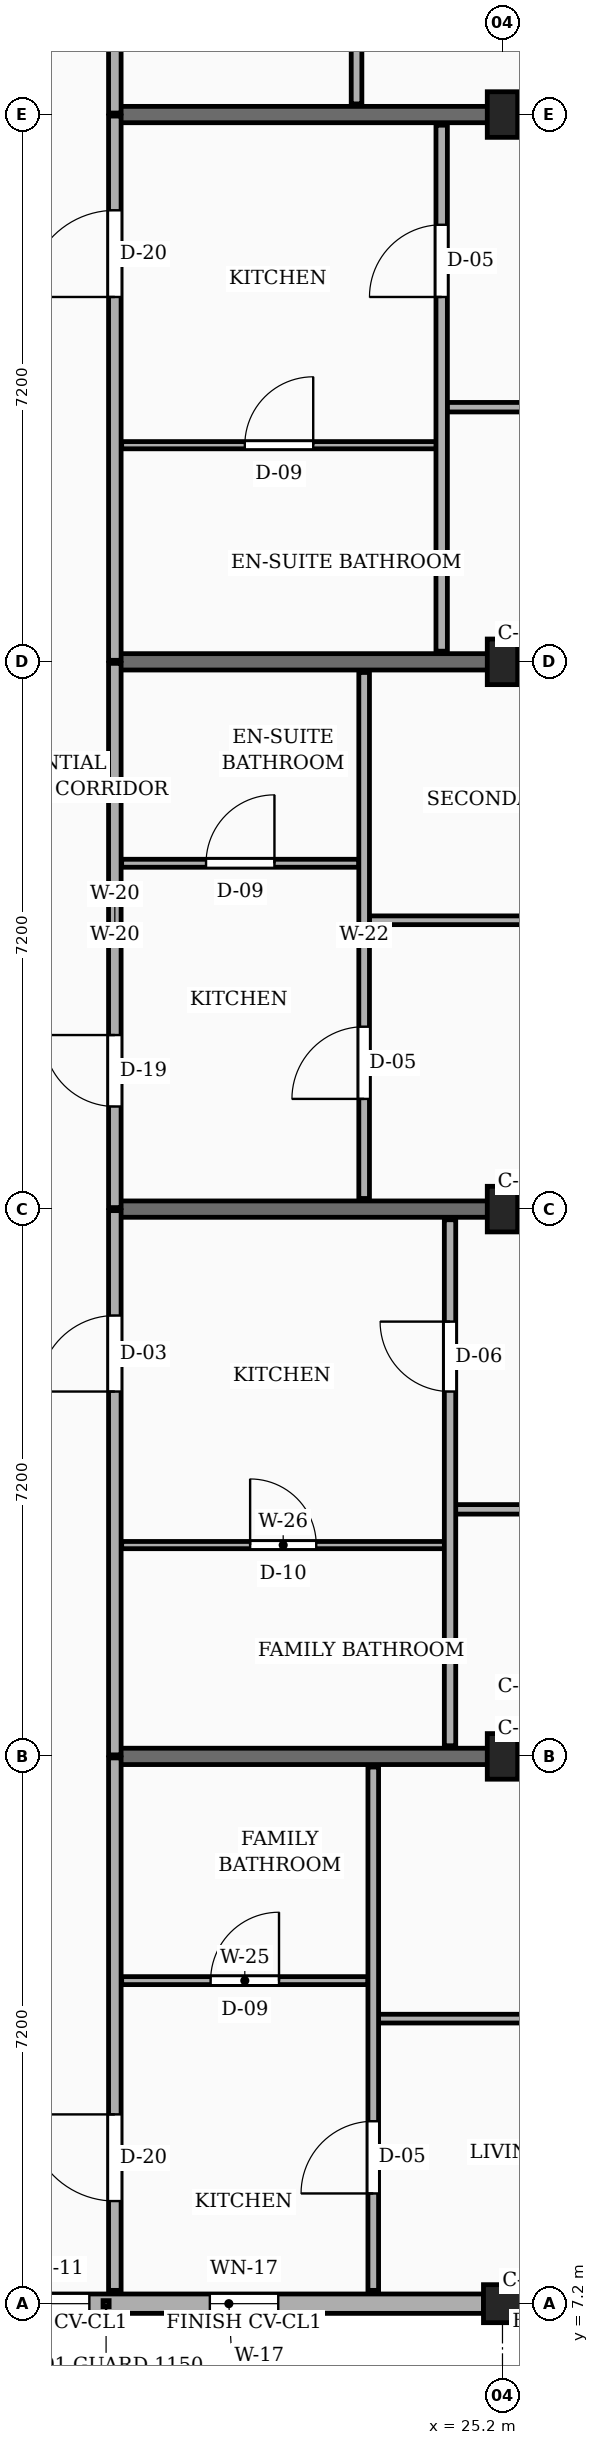
"""IFC4 building model, lengths in metres.
Left out: names, types, materials, properties, quantities, classifications, styles, units other than length and angle.
Written with IfcOpenShell. Run it as: python <this file> out.ifc"""

import sys

from ifc_helpers import new_model, si_unit, direction, frame, frame_2d, origin, origin_2d, place, context, subcontext, project, spatial, rectangle, extrude, element, fill, save


model = new_model("IFC4")
c1 = context("Model", 3, precision=1e-05, world=origin(), true_north=direction((0.0, 1.0)))
c2 = subcontext(c1, "Body", "Model", "MODEL_VIEW")
j1 = project(units=[si_unit("LENGTHUNIT", "METRE"), si_unit("PLANEANGLEUNIT", "RADIAN")], contexts=[c1])
p1 = place(None, origin())
s1 = spatial("IfcSite", under=j1, at=p1, CompositionType="ELEMENT")
p2 = place(p1, origin())
s2 = spatial("IfcBuilding", under=s1, at=p2, CompositionType="ELEMENT")
p3 = place(p2, frame((0.0, 0.0, 32.85)))
s3 = spatial("IfcBuildingStorey", under=s2, at=p3, CompositionType="ELEMENT", Elevation=32.85)
p4 = place(p3, frame((25.2, 7.2, 0.0), z_axis=(0.0, 0.0, 1.0), x_axis=(1.0, 0.0, 0.0)))
e1 = element("IfcColumn", 1, at=p4, inside=s3, PredefinedType="COLUMN", context=c2, shape_type="SweptSolid", body=[
    extrude(rectangle(XDim=0.5, YDim=0.5, at=origin_2d()), origin(), (0.0, 0.0, 1.0), 3.15),
])
for number, where, z_axis, x_axis in (
    (2, (25.2, 14.4, 0.0), (0.0, 0.0, 1.0), (1.0, 0.0, 0.0)),
    (3, (25.2, 21.6, 0.0), (0.0, 0.0, 1.0), (1.0, 0.0, 0.0)),
    (4, (25.2, 28.8, 0.0), (0.0, 0.0, 1.0), (1.0, 0.0, 0.0)),
    (5, (25.2, 36.0, 0.0), (0.0, 0.0, 1.0), (1.0, 0.0, 0.0)),
):
    element("IfcColumn", number, at=place(p3, frame(where, z_axis=z_axis, x_axis=x_axis)), inside=s3, PredefinedType="COLUMN", context=c2, shape_type="SweptSolid", body=[
        extrude(rectangle(XDim=0.4, YDim=0.6, at=origin_2d()), origin(), (0.0, 0.0, 1.0), 3.15),
    ])
for number, where, z_axis, x_axis in (
    (6, (20.1, 14.4, 0.0), (0.0, 0.0, 1.0), (1.0, 0.0, 0.0)),
    (7, (20.1, 21.6, 0.0), (0.0, 0.0, 1.0), (1.0, 0.0, 0.0)),
    (8, (20.1, 28.8, 0.0), (0.0, 0.0, 1.0), (1.0, 0.0, 0.0)),
    (9, (20.1, 36.0, 0.0), (0.0, 0.0, 1.0), (1.0, 0.0, 0.0)),
):
    element("IfcWall", number, at=place(p3, frame(where, z_axis=z_axis, x_axis=x_axis)), inside=s3, PredefinedType="SOLIDWALL", context=c2, shape_type="SweptSolid", body=[
        extrude(rectangle(XDim=12.05, YDim=0.215, at=frame_2d((6.025, 0.0))), origin(), (0.0, 0.0, 1.0), 2.17),
    ])
p5 = place(p3, frame((18.25, 7.2, 0.0), z_axis=(0.0, 0.0, 1.0), x_axis=(1.0, 0.0, 0.0)))
e10 = element("IfcWall", 10, at=p5, inside=s3, PredefinedType="SOLIDWALL", context=c2, shape_type="SweptSolid", body=[
    extrude(rectangle(XDim=6.7, YDim=0.255, at=frame_2d((3.35, 0.0))), origin(), (0.0, 0.0, 1.0), 2.44),
])
p6 = place(p5, frame((0.475, 0.0, 0.78)))
e11 = element("IfcOpeningElement", 11, at=p6, cuts=e10, PredefinedType="OPENING", context=c2, shape_type="SweptSolid", body=[
    extrude(rectangle(XDim=1.04, YDim=1.26, at=frame_2d((0.52, 0.63))), frame((0.0, 0.137, 0.0), z_axis=(0.0, -1.0, 0.0), x_axis=(1.0, 0.0, 0.0)), (0.0, 0.0, 1.0), 0.275),
])
p7 = place(p5, frame((3.1, 0.0, 0.78)))
e12 = element("IfcOpeningElement", 12, at=p7, cuts=e10, PredefinedType="OPENING", context=c2, shape_type="SweptSolid", body=[
    extrude(rectangle(XDim=0.9, YDim=1.36, at=frame_2d((0.45, 0.68))), frame((0.0, 0.137, 0.0), z_axis=(0.0, -1.0, 0.0), x_axis=(1.0, 0.0, 0.0)), (0.0, 0.0, 1.0), 0.275),
])
p8 = place(p3, frame((20.1, 7.375, 0.0), z_axis=(0.0, 0.0, 1.0), x_axis=(0.0, 1.0, 0.0)))
e13 = element("IfcWall", 13, at=p8, inside=s3, PredefinedType="PARTITIONING", context=c2, shape_type="SweptSolid", body=[
    extrude(rectangle(XDim=7.005, YDim=0.165, at=frame_2d((3.502, 0.0))), origin(), (0.0, 0.0, 1.0), 2.305),
])
p9 = place(p8, frame((1.175, 0.0, 0.0)))
e14 = element("IfcOpeningElement", 14, at=p9, cuts=e13, PredefinedType="OPENING", context=c2, shape_type="SweptSolid", body=[
    extrude(rectangle(XDim=1.14, YDim=2.18, at=frame_2d((0.57, 1.09))), frame((0.0, 0.093, 0.0), z_axis=(0.0, -1.0, 0.0), x_axis=(1.0, 0.0, 0.0)), (0.0, 0.0, 1.0), 0.185),
])
p10 = place(p3, frame((20.1, 14.42, 0.0), z_axis=(0.0, 0.0, 1.0), x_axis=(0.0, 1.0, 0.0)))
e15 = element("IfcWall", 15, at=p10, inside=s3, PredefinedType="PARTITIONING", context=c2, shape_type="SweptSolid", body=[
    extrude(rectangle(XDim=7.16, YDim=0.165, at=frame_2d((3.58, 0.0))), origin(), (0.0, 0.0, 1.0), 2.305),
])
p11 = place(p10, frame((4.78, 0.0, 0.0)))
e16 = element("IfcOpeningElement", 16, at=p11, cuts=e15, PredefinedType="OPENING", context=c2, shape_type="SweptSolid", body=[
    extrude(rectangle(XDim=1.0, YDim=2.15, at=frame_2d((0.5, 1.075))), frame((0.0, 0.093, 0.0), z_axis=(0.0, -1.0, 0.0), x_axis=(1.0, 0.0, 0.0)), (0.0, 0.0, 1.0), 0.185),
])
p12 = place(p3, frame((20.1, 21.62, 0.0), z_axis=(0.0, 0.0, 1.0), x_axis=(0.0, 1.0, 0.0)))
e17 = element("IfcWall", 17, at=p12, inside=s3, PredefinedType="PARTITIONING", context=c2, shape_type="SweptSolid", body=[
    extrude(rectangle(XDim=7.16, YDim=0.165, at=frame_2d((3.58, 0.0))), origin(), (0.0, 0.0, 1.0), 2.305),
])
p13 = place(p12, frame((1.33, 0.0, 0.0)))
e18 = element("IfcOpeningElement", 18, at=p13, cuts=e17, PredefinedType="OPENING", context=c2, shape_type="SweptSolid", body=[
    extrude(rectangle(XDim=0.94, YDim=2.12, at=frame_2d((0.47, 1.06))), frame((0.0, 0.093, 0.0), z_axis=(0.0, -1.0, 0.0), x_axis=(1.0, 0.0, 0.0)), (0.0, 0.0, 1.0), 0.185),
])
p14 = place(p3, frame((20.1, 28.82, 0.0), z_axis=(0.0, 0.0, 1.0), x_axis=(0.0, 1.0, 0.0)))
e19 = element("IfcWall", 19, at=p14, inside=s3, PredefinedType="PARTITIONING", context=c2, shape_type="SweptSolid", body=[
    extrude(rectangle(XDim=7.16, YDim=0.165, at=frame_2d((3.58, 0.0))), origin(), (0.0, 0.0, 1.0), 2.305),
])
p15 = place(p14, frame((4.78, 0.0, 0.0)))
e20 = element("IfcOpeningElement", 20, at=p15, cuts=e19, PredefinedType="OPENING", context=c2, shape_type="SweptSolid", body=[
    extrude(rectangle(XDim=1.14, YDim=2.18, at=frame_2d((0.57, 1.09))), frame((0.0, 0.093, 0.0), z_axis=(0.0, -1.0, 0.0), x_axis=(1.0, 0.0, 0.0)), (0.0, 0.0, 1.0), 0.185),
])
p16 = place(p3, frame((20.1, 36.02, 0.0), z_axis=(0.0, 0.0, 1.0), x_axis=(0.0, 1.0, 0.0)))
e21 = element("IfcWall", 21, at=p16, inside=s3, PredefinedType="PARTITIONING", context=c2, shape_type="SweptSolid", body=[
    extrude(rectangle(XDim=7.005, YDim=0.165, at=frame_2d((3.502, 0.0))), origin(), (0.0, 0.0, 1.0), 2.305),
])
p17 = place(p16, frame((1.33, 0.0, 0.0)))
e22 = element("IfcOpeningElement", 22, at=p17, cuts=e21, PredefinedType="OPENING", context=c2, shape_type="SweptSolid", body=[
    extrude(rectangle(XDim=1.0, YDim=2.15, at=frame_2d((0.5, 1.075))), frame((0.0, 0.093, 0.0), z_axis=(0.0, -1.0, 0.0), x_axis=(1.0, 0.0, 0.0)), (0.0, 0.0, 1.0), 0.185),
])
p18 = place(p3, frame((23.57, 10.95, 0.0), z_axis=(0.0, 0.0, 1.0), x_axis=(1.0, 0.0, 0.0)))
e23 = element("IfcWall", 23, at=p18, inside=s3, PredefinedType="PARTITIONING", context=c2, shape_type="SweptSolid", body=[
    extrude(rectangle(XDim=8.655, YDim=0.115, at=frame_2d((4.328, 0.0))), origin(), (0.0, 0.0, 1.0), 2.305),
])
p19 = place(p18, frame((3.877, 0.0, 0.0)))
e24 = element("IfcOpeningElement", 24, at=p19, cuts=e23, PredefinedType="OPENING", context=c2, shape_type="SweptSolid", body=[
    extrude(rectangle(XDim=0.9, YDim=2.1, at=frame_2d((0.45, 1.05))), frame((0.0, 0.067, 0.0), z_axis=(0.0, -1.0, 0.0), x_axis=(1.0, 0.0, 0.0)), (0.0, 0.0, 1.0), 0.135),
])
p20 = place(p3, frame((20.19, 11.45, 0.0), z_axis=(0.0, 0.0, 1.0), x_axis=(1.0, 0.0, 0.0)))
e25 = element("IfcWall", 25, at=p20, inside=s3, PredefinedType="PARTITIONING", context=c2, shape_type="SweptSolid", body=[
    extrude(rectangle(XDim=3.24, YDim=0.105, at=frame_2d((1.62, 0.0))), origin(), (0.0, 0.0, 1.0), 2.305),
])
p21 = place(p20, frame((1.17, 0.0, 0.0)))
e26 = element("IfcOpeningElement", 26, at=p21, cuts=e25, PredefinedType="OPENING", context=c2, shape_type="SweptSolid", body=[
    extrude(rectangle(XDim=0.9, YDim=2.05, at=frame_2d((0.45, 1.025))), frame((0.0, 0.062, 0.0), z_axis=(0.0, -1.0, 0.0), x_axis=(1.0, 0.0, 0.0)), (0.0, 0.0, 1.0), 0.125),
])
p22 = place(p3, frame((23.5, 7.375, 0.0), z_axis=(0.0, 0.0, 1.0), x_axis=(0.0, 1.0, 0.0)))
e27 = element("IfcWall", 27, at=p22, inside=s3, PredefinedType="PARTITIONING", context=c2, shape_type="SweptSolid", body=[
    extrude(rectangle(XDim=6.885, YDim=0.14, at=frame_2d((3.442, 0.0))), origin(), (0.0, 0.0, 1.0), 2.305),
])
p23 = place(p22, frame((1.275, 0.0, 0.0)))
e28 = element("IfcOpeningElement", 28, at=p23, cuts=e27, PredefinedType="OPENING", context=c2, shape_type="SweptSolid", body=[
    extrude(rectangle(XDim=0.95, YDim=2.1, at=frame_2d((0.475, 1.05))), frame((0.0, 0.08, 0.0), z_axis=(0.0, -1.0, 0.0), x_axis=(1.0, 0.0, 0.0)), (0.0, 0.0, 1.0), 0.16),
])
p24 = place(p3, frame((24.58, 17.65, 0.0), z_axis=(0.0, 0.0, 1.0), x_axis=(1.0, 0.0, 0.0)))
e29 = element("IfcWall", 29, at=p24, inside=s3, PredefinedType="PARTITIONING", context=c2, shape_type="SweptSolid", body=[
    extrude(rectangle(XDim=7.645, YDim=0.125, at=frame_2d((3.823, 0.0))), origin(), (0.0, 0.0, 1.0), 2.305),
])
p25 = place(p24, frame((3.383, 0.0, 0.0)))
e30 = element("IfcOpeningElement", 30, at=p25, cuts=e29, PredefinedType="OPENING", context=c2, shape_type="SweptSolid", body=[
    extrude(rectangle(XDim=0.88, YDim=2.08, at=frame_2d((0.44, 1.04))), frame((0.0, 0.073, 0.0), z_axis=(0.0, -1.0, 0.0), x_axis=(1.0, 0.0, 0.0)), (0.0, 0.0, 1.0), 0.145),
])
p26 = place(p3, frame((20.19, 17.18, 0.0), z_axis=(0.0, 0.0, 1.0), x_axis=(1.0, 0.0, 0.0)))
e31 = element("IfcWall", 31, at=p26, inside=s3, PredefinedType="PARTITIONING", context=c2, shape_type="SweptSolid", body=[
    extrude(rectangle(XDim=4.25, YDim=0.095, at=frame_2d((2.125, 0.0))), origin(), (0.0, 0.0, 1.0), 2.305),
])
p27 = place(p26, frame((1.69, 0.0, 0.0)))
e32 = element("IfcOpeningElement", 32, at=p27, cuts=e31, PredefinedType="OPENING", context=c2, shape_type="SweptSolid", body=[
    extrude(rectangle(XDim=0.87, YDim=2.05, at=frame_2d((0.435, 1.025))), frame((0.0, 0.058, 0.0), z_axis=(0.0, -1.0, 0.0), x_axis=(1.0, 0.0, 0.0)), (0.0, 0.0, 1.0), 0.115),
])
p28 = place(p3, frame((24.51, 14.54, 0.0), z_axis=(0.0, 0.0, 1.0), x_axis=(0.0, 1.0, 0.0)))
e33 = element("IfcWall", 33, at=p28, inside=s3, PredefinedType="PARTITIONING", context=c2, shape_type="SweptSolid", body=[
    extrude(rectangle(XDim=6.92, YDim=0.15, at=frame_2d((3.46, 0.0))), origin(), (0.0, 0.0, 1.0), 2.305),
])
p29 = place(p28, frame((4.66, 0.0, 0.0)))
e34 = element("IfcOpeningElement", 34, at=p29, cuts=e33, PredefinedType="OPENING", context=c2, shape_type="SweptSolid", body=[
    extrude(rectangle(XDim=0.92, YDim=2.1, at=frame_2d((0.46, 1.05))), frame((0.0, 0.085, 0.0), z_axis=(0.0, -1.0, 0.0), x_axis=(1.0, 0.0, 0.0)), (0.0, 0.0, 1.0), 0.17),
])
p30 = place(p3, frame((23.45, 25.4, 0.0), z_axis=(0.0, 0.0, 1.0), x_axis=(1.0, 0.0, 0.0)))
e35 = element("IfcWall", 35, at=p30, inside=s3, PredefinedType="PARTITIONING", context=c2, shape_type="SweptSolid", body=[
    extrude(rectangle(XDim=8.775, YDim=0.115, at=frame_2d((4.388, 0.0))), origin(), (0.0, 0.0, 1.0), 2.305),
])
p31 = place(p30, frame((3.938, 0.0, 0.0)))
e36 = element("IfcOpeningElement", 36, at=p31, cuts=e35, PredefinedType="OPENING", context=c2, shape_type="SweptSolid", body=[
    extrude(rectangle(XDim=0.9, YDim=2.1, at=frame_2d((0.45, 1.05))), frame((0.0, 0.067, 0.0), z_axis=(0.0, -1.0, 0.0), x_axis=(1.0, 0.0, 0.0)), (0.0, 0.0, 1.0), 0.135),
])
p32 = place(p3, frame((20.19, 26.15, 0.0), z_axis=(0.0, 0.0, 1.0), x_axis=(1.0, 0.0, 0.0)))
e37 = element("IfcWall", 37, at=p32, inside=s3, PredefinedType="PARTITIONING", context=c2, shape_type="SweptSolid", body=[
    extrude(rectangle(XDim=3.12, YDim=0.105, at=frame_2d((1.56, 0.0))), origin(), (0.0, 0.0, 1.0), 2.305),
])
p33 = place(p32, frame((1.11, 0.0, 0.0)))
e38 = element("IfcOpeningElement", 38, at=p33, cuts=e37, PredefinedType="OPENING", context=c2, shape_type="SweptSolid", body=[
    extrude(rectangle(XDim=0.9, YDim=2.05, at=frame_2d((0.45, 1.025))), frame((0.0, 0.062, 0.0), z_axis=(0.0, -1.0, 0.0), x_axis=(1.0, 0.0, 0.0)), (0.0, 0.0, 1.0), 0.125),
])
p34 = place(p3, frame((23.38, 21.74, 0.0), z_axis=(0.0, 0.0, 1.0), x_axis=(0.0, 1.0, 0.0)))
e39 = element("IfcWall", 39, at=p34, inside=s3, PredefinedType="PARTITIONING", context=c2, shape_type="SweptSolid", body=[
    extrude(rectangle(XDim=6.92, YDim=0.14, at=frame_2d((3.46, 0.0))), origin(), (0.0, 0.0, 1.0), 2.305),
])
p35 = place(p34, frame((1.31, 0.0, 0.0)))
e40 = element("IfcOpeningElement", 40, at=p35, cuts=e39, PredefinedType="OPENING", context=c2, shape_type="SweptSolid", body=[
    extrude(rectangle(XDim=0.95, YDim=2.1, at=frame_2d((0.475, 1.05))), frame((0.0, 0.08, 0.0), z_axis=(0.0, -1.0, 0.0), x_axis=(1.0, 0.0, 0.0)), (0.0, 0.0, 1.0), 0.16),
])
p36 = place(p3, frame((24.47, 32.15, 0.0), z_axis=(0.0, 0.0, 1.0), x_axis=(1.0, 0.0, 0.0)))
e41 = element("IfcWall", 41, at=p36, inside=s3, PredefinedType="PARTITIONING", context=c2, shape_type="SweptSolid", body=[
    extrude(rectangle(XDim=7.755, YDim=0.125, at=frame_2d((3.877, 0.0))), origin(), (0.0, 0.0, 1.0), 2.305),
])
p37 = place(p36, frame((3.427, 0.0, 0.0)))
e42 = element("IfcOpeningElement", 42, at=p37, cuts=e41, PredefinedType="OPENING", context=c2, shape_type="SweptSolid", body=[
    extrude(rectangle(XDim=0.9, YDim=2.1, at=frame_2d((0.45, 1.05))), frame((0.0, 0.073, 0.0), z_axis=(0.0, -1.0, 0.0), x_axis=(1.0, 0.0, 0.0)), (0.0, 0.0, 1.0), 0.145),
])
p38 = place(p3, frame((20.19, 31.65, 0.0), z_axis=(0.0, 0.0, 1.0), x_axis=(1.0, 0.0, 0.0)))
e43 = element("IfcWall", 43, at=p38, inside=s3, PredefinedType="PARTITIONING", context=c2, shape_type="SweptSolid", body=[
    extrude(rectangle(XDim=4.14, YDim=0.095, at=frame_2d((2.07, 0.0))), origin(), (0.0, 0.0, 1.0), 2.305),
])
p39 = place(p38, frame((1.62, 0.0, 0.0)))
e44 = element("IfcOpeningElement", 44, at=p39, cuts=e43, PredefinedType="OPENING", context=c2, shape_type="SweptSolid", body=[
    extrude(rectangle(XDim=0.9, YDim=2.05, at=frame_2d((0.45, 1.025))), frame((0.0, 0.058, 0.0), z_axis=(0.0, -1.0, 0.0), x_axis=(1.0, 0.0, 0.0)), (0.0, 0.0, 1.0), 0.115),
])
p40 = place(p3, frame((24.4, 28.94, 0.0), z_axis=(0.0, 0.0, 1.0), x_axis=(0.0, 1.0, 0.0)))
e45 = element("IfcWall", 45, at=p40, inside=s3, PredefinedType="PARTITIONING", context=c2, shape_type="SweptSolid", body=[
    extrude(rectangle(XDim=6.92, YDim=0.15, at=frame_2d((3.46, 0.0))), origin(), (0.0, 0.0, 1.0), 2.305),
])
p41 = place(p40, frame((4.66, 0.0, 0.0)))
e46 = element("IfcOpeningElement", 46, at=p41, cuts=e45, PredefinedType="OPENING", context=c2, shape_type="SweptSolid", body=[
    extrude(rectangle(XDim=0.95, YDim=2.1, at=frame_2d((0.475, 1.05))), frame((0.0, 0.085, 0.0), z_axis=(0.0, -1.0, 0.0), x_axis=(1.0, 0.0, 0.0)), (0.0, 0.0, 1.0), 0.17),
])
p42 = place(p3, frame((23.28, 36.14, 0.0), z_axis=(0.0, 0.0, 1.0), x_axis=(0.0, 1.0, 0.0)))
e47 = element("IfcWall", 47, at=p42, inside=s3, PredefinedType="PARTITIONING", context=c2, shape_type="SweptSolid", body=[
    extrude(rectangle(XDim=6.885, YDim=0.14, at=frame_2d((3.442, 0.0))), origin(), (0.0, 0.0, 1.0), 2.305),
])
p43 = place(p42, frame((1.31, 0.0, 0.0)))
e48 = element("IfcOpeningElement", 48, at=p43, cuts=e47, PredefinedType="OPENING", context=c2, shape_type="SweptSolid", body=[
    extrude(rectangle(XDim=0.92, YDim=2.1, at=frame_2d((0.46, 1.05))), frame((0.0, 0.08, 0.0), z_axis=(0.0, -1.0, 0.0), x_axis=(1.0, 0.0, 0.0)), (0.0, 0.0, 1.0), 0.16),
])
p44 = place(p6, origin())
e49 = element("IfcWindow", 49, at=p44, inside=s3, PartitioningType="SINGLE_PANEL", PredefinedType="WINDOW", context=c2, shape_type="SweptSolid", body=[
    extrude(rectangle(XDim=1.04, YDim=1.26, at=frame_2d((0.52, 0.63))), frame((0.0, 0.03, 0.0), z_axis=(0.0, -1.0, 0.0), x_axis=(1.0, 0.0, 0.0)), (0.0, 0.0, 1.0), 0.06),
])
fill(e11, e49)
p45 = place(p7, origin())
e50 = element("IfcWindow", 50, at=p45, inside=s3, PartitioningType="SINGLE_PANEL", PredefinedType="WINDOW", context=c2, shape_type="SweptSolid", body=[
    extrude(rectangle(XDim=0.9, YDim=1.36, at=frame_2d((0.45, 0.68))), frame((0.0, 0.03, 0.0), z_axis=(0.0, -1.0, 0.0), x_axis=(1.0, 0.0, 0.0)), (0.0, 0.0, 1.0), 0.06),
])
fill(e12, e50)
p46 = place(p9, origin())
e51 = element("IfcDoor", 51, at=p46, inside=s3, OperationType="SINGLE_SWING_RIGHT", PredefinedType="DOOR", context=c2, shape_type="SweptSolid", body=[
    extrude(rectangle(XDim=1.14, YDim=2.18, at=frame_2d((0.57, 1.09))), frame((0.0, 0.025, 0.0), z_axis=(0.0, -1.0, 0.0), x_axis=(1.0, 0.0, 0.0)), (0.0, 0.0, 1.0), 0.05),
])
fill(e14, e51)
p47 = place(p11, origin())
e52 = element("IfcDoor", 52, at=p47, inside=s3, OperationType="SINGLE_SWING_LEFT", PredefinedType="DOOR", context=c2, shape_type="SweptSolid", body=[
    extrude(rectangle(XDim=1.0, YDim=2.15, at=frame_2d((0.5, 1.075))), frame((0.0, 0.025, 0.0), z_axis=(0.0, -1.0, 0.0), x_axis=(1.0, 0.0, 0.0)), (0.0, 0.0, 1.0), 0.05),
])
fill(e16, e52)
p48 = place(p13, origin())
e53 = element("IfcDoor", 53, at=p48, inside=s3, OperationType="SINGLE_SWING_RIGHT", PredefinedType="DOOR", context=c2, shape_type="SweptSolid", body=[
    extrude(rectangle(XDim=0.94, YDim=2.12, at=frame_2d((0.47, 1.06))), frame((0.0, 0.025, 0.0), z_axis=(0.0, -1.0, 0.0), x_axis=(1.0, 0.0, 0.0)), (0.0, 0.0, 1.0), 0.05),
])
fill(e18, e53)
p49 = place(p15, origin())
e54 = element("IfcDoor", 54, at=p49, inside=s3, OperationType="SINGLE_SWING_LEFT", PredefinedType="DOOR", context=c2, shape_type="SweptSolid", body=[
    extrude(rectangle(XDim=1.14, YDim=2.18, at=frame_2d((0.57, 1.09))), frame((0.0, 0.025, 0.0), z_axis=(0.0, -1.0, 0.0), x_axis=(1.0, 0.0, 0.0)), (0.0, 0.0, 1.0), 0.05),
])
fill(e20, e54)
p50 = place(p21, origin())
e55 = element("IfcDoor", 55, at=p50, inside=s3, OperationType="SINGLE_SWING_RIGHT", PredefinedType="DOOR", context=c2, shape_type="SweptSolid", body=[
    extrude(rectangle(XDim=0.9, YDim=2.05, at=frame_2d((0.45, 1.025))), frame((0.0, 0.025, 0.0), z_axis=(0.0, -1.0, 0.0), x_axis=(1.0, 0.0, 0.0)), (0.0, 0.0, 1.0), 0.05),
])
fill(e26, e55)
p51 = place(p23, origin())
e56 = element("IfcDoor", 56, at=p51, inside=s3, OperationType="SINGLE_SWING_LEFT", PredefinedType="DOOR", context=c2, shape_type="SweptSolid", body=[
    extrude(rectangle(XDim=0.95, YDim=2.1, at=frame_2d((0.475, 1.05))), frame((0.0, 0.025, 0.0), z_axis=(0.0, -1.0, 0.0), x_axis=(1.0, 0.0, 0.0)), (0.0, 0.0, 1.0), 0.05),
])
fill(e28, e56)
p52 = place(p27, origin())
e57 = element("IfcDoor", 57, at=p52, inside=s3, OperationType="SINGLE_SWING_LEFT", PredefinedType="DOOR", context=c2, shape_type="SweptSolid", body=[
    extrude(rectangle(XDim=0.87, YDim=2.05, at=frame_2d((0.435, 1.025))), frame((0.0, 0.025, 0.0), z_axis=(0.0, -1.0, 0.0), x_axis=(1.0, 0.0, 0.0)), (0.0, 0.0, 1.0), 0.05),
])
fill(e32, e57)
p53 = place(p29, origin())
e58 = element("IfcDoor", 58, at=p53, inside=s3, OperationType="SINGLE_SWING_RIGHT", PredefinedType="DOOR", context=c2, shape_type="SweptSolid", body=[
    extrude(rectangle(XDim=0.92, YDim=2.1, at=frame_2d((0.46, 1.05))), frame((0.0, 0.025, 0.0), z_axis=(0.0, -1.0, 0.0), x_axis=(1.0, 0.0, 0.0)), (0.0, 0.0, 1.0), 0.05),
])
fill(e34, e58)
p54 = place(p33, origin())
e59 = element("IfcDoor", 59, at=p54, inside=s3, OperationType="SINGLE_SWING_RIGHT", PredefinedType="DOOR", context=c2, shape_type="SweptSolid", body=[
    extrude(rectangle(XDim=0.9, YDim=2.05, at=frame_2d((0.45, 1.025))), frame((0.0, 0.025, 0.0), z_axis=(0.0, -1.0, 0.0), x_axis=(1.0, 0.0, 0.0)), (0.0, 0.0, 1.0), 0.05),
])
fill(e38, e59)
p55 = place(p35, origin())
e60 = element("IfcDoor", 60, at=p55, inside=s3, OperationType="SINGLE_SWING_LEFT", PredefinedType="DOOR", context=c2, shape_type="SweptSolid", body=[
    extrude(rectangle(XDim=0.95, YDim=2.1, at=frame_2d((0.475, 1.05))), frame((0.0, 0.025, 0.0), z_axis=(0.0, -1.0, 0.0), x_axis=(1.0, 0.0, 0.0)), (0.0, 0.0, 1.0), 0.05),
])
fill(e40, e60)
p56 = place(p39, origin())
e61 = element("IfcDoor", 61, at=p56, inside=s3, OperationType="SINGLE_SWING_RIGHT", PredefinedType="DOOR", context=c2, shape_type="SweptSolid", body=[
    extrude(rectangle(XDim=0.9, YDim=2.05, at=frame_2d((0.45, 1.025))), frame((0.0, 0.025, 0.0), z_axis=(0.0, -1.0, 0.0), x_axis=(1.0, 0.0, 0.0)), (0.0, 0.0, 1.0), 0.05),
])
fill(e44, e61)
p57 = place(p41, origin())
e62 = element("IfcDoor", 62, at=p57, inside=s3, OperationType="SINGLE_SWING_LEFT", PredefinedType="DOOR", context=c2, shape_type="SweptSolid", body=[
    extrude(rectangle(XDim=0.95, YDim=2.1, at=frame_2d((0.475, 1.05))), frame((0.0, 0.025, 0.0), z_axis=(0.0, -1.0, 0.0), x_axis=(1.0, 0.0, 0.0)), (0.0, 0.0, 1.0), 0.05),
])
fill(e46, e62)
save(model, sys.argv[1])
